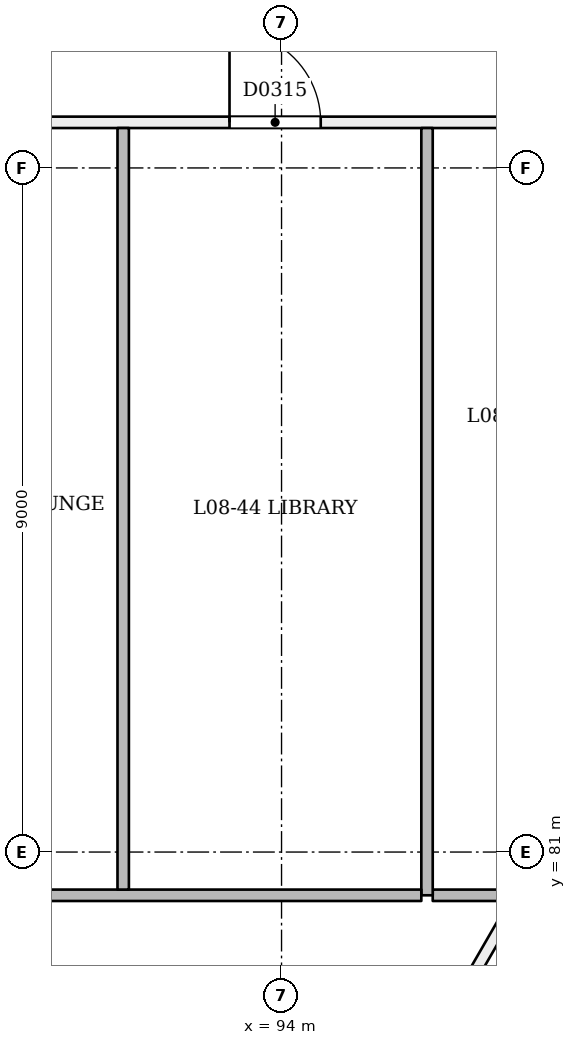
"""IFC4 building model, lengths in metres.
Left out: names, types, materials, properties, quantities, classifications, styles, units other than length and angle.
Written with IfcOpenShell. Run it as: python <this file> out.ifc"""

import sys

from ifc_helpers import new_model, si_unit, direction, frame, frame_2d, origin, place, context, subcontext, project, spatial, rectangle, extrude, element, fill, save


model = new_model("IFC4")
c1 = context("Model", 3, precision=1e-05, world=origin(), true_north=direction((0.0, 1.0)))
c2 = subcontext(c1, "Body", "Model", "MODEL_VIEW")
j1 = project(units=[si_unit("LENGTHUNIT", "METRE"), si_unit("PLANEANGLEUNIT", "RADIAN")], contexts=[c1])
p1 = place(None, origin())
s1 = spatial("IfcSite", under=j1, at=p1, CompositionType="ELEMENT")
p2 = place(p1, origin())
s2 = spatial("IfcBuilding", under=s1, at=p2, CompositionType="ELEMENT")
p3 = place(p2, frame((0.0, 0.0, 37.8)))
s3 = spatial("IfcBuildingStorey", under=s2, at=p3, CompositionType="ELEMENT", Elevation=37.8)
p4 = place(p3, frame((88.317, 61.577, 0.0), z_axis=(0.0, 0.0, 1.0), x_axis=(0.49999894854, 0.866026010844, 0.0)))
e1 = element("IfcWall", 1, at=p4, inside=s3, PredefinedType="PARTITIONING", context=c2, shape_type="SweptSolid", body=[
    extrude(rectangle(XDim=36.0, YDim=0.15, at=frame_2d((18.0, 0.0))), origin(), (0.0, 0.0, 1.0), 2.7),
])
p5 = place(p4, frame((0.72, 0.0, 0.0)))
e2 = element("IfcOpeningElement", 2, at=p5, cuts=e1, PredefinedType="OPENING", context=c2, shape_type="SweptSolid", body=[
    extrude(rectangle(XDim=1.0, YDim=2.1, at=frame_2d((0.5, 1.05))), frame((0.0, 0.085, 0.0), z_axis=(0.0, -1.0, 0.0), x_axis=(1.0, 0.0, 0.0)), (0.0, 0.0, 1.0), 0.171),
])
p6 = place(p4, frame((7.395, 0.0, 0.0)))
e3 = element("IfcOpeningElement", 3, at=p6, cuts=e1, PredefinedType="OPENING", context=c2, shape_type="SweptSolid", body=[
    extrude(rectangle(XDim=1.0, YDim=2.1, at=frame_2d((0.5, 1.05))), frame((0.0, 0.085, 0.0), z_axis=(0.0, -1.0, 0.0), x_axis=(1.0, 0.0, 0.0)), (0.0, 0.0, 1.0), 0.171),
])
p7 = place(p4, frame((9.605, 0.0, 0.0)))
e4 = element("IfcOpeningElement", 4, at=p7, cuts=e1, PredefinedType="OPENING", context=c2, shape_type="SweptSolid", body=[
    extrude(rectangle(XDim=1.0, YDim=2.1, at=frame_2d((0.5, 1.05))), frame((0.0, 0.085, 0.0), z_axis=(0.0, -1.0, 0.0), x_axis=(1.0, 0.0, 0.0)), (0.0, 0.0, 1.0), 0.171),
])
p8 = place(p4, frame((15.25, 0.0, 0.0)))
e5 = element("IfcOpeningElement", 5, at=p8, cuts=e1, PredefinedType="OPENING", context=c2, shape_type="SweptSolid", body=[
    extrude(rectangle(XDim=1.0, YDim=2.1, at=frame_2d((0.5, 1.05))), frame((0.0, 0.085, 0.0), z_axis=(0.0, -1.0, 0.0), x_axis=(1.0, 0.0, 0.0)), (0.0, 0.0, 1.0), 0.171),
])
p9 = place(p4, frame((18.605, 0.0, 0.0)))
e6 = element("IfcOpeningElement", 6, at=p9, cuts=e1, PredefinedType="OPENING", context=c2, shape_type="SweptSolid", body=[
    extrude(rectangle(XDim=1.0, YDim=2.1, at=frame_2d((0.5, 1.05))), frame((0.0, 0.085, 0.0), z_axis=(0.0, -1.0, 0.0), x_axis=(1.0, 0.0, 0.0)), (0.0, 0.0, 1.0), 0.171),
])
p10 = place(p4, frame((25.395, 0.0, 0.0)))
e7 = element("IfcOpeningElement", 7, at=p10, cuts=e1, PredefinedType="OPENING", context=c2, shape_type="SweptSolid", body=[
    extrude(rectangle(XDim=1.0, YDim=2.1, at=frame_2d((0.5, 1.05))), frame((0.0, 0.085, 0.0), z_axis=(0.0, -1.0, 0.0), x_axis=(1.0, 0.0, 0.0)), (0.0, 0.0, 1.0), 0.171),
])
p11 = place(p4, frame((29.8, 0.0, 0.0)))
e8 = element("IfcOpeningElement", 8, at=p11, cuts=e1, PredefinedType="OPENING", context=c2, shape_type="SweptSolid", body=[
    extrude(rectangle(XDim=1.2, YDim=2.1, at=frame_2d((0.6, 1.05))), frame((0.0, 0.085, 0.0), z_axis=(0.0, -1.0, 0.0), x_axis=(1.0, 0.0, 0.0)), (0.0, 0.0, 1.0), 0.171),
])
p12 = place(p3, frame((88.106, 90.6, 0.0), z_axis=(0.0, 0.0, 1.0), x_axis=(1.0, 0.0, 0.0)))
e9 = element("IfcWall", 9, at=p12, inside=s3, PredefinedType="PARTITIONING", context=c2, shape_type="SweptSolid", body=[
    extrude(rectangle(XDim=14.759, YDim=0.15, at=frame_2d((7.379, 0.0))), origin(), (0.0, 0.0, 1.0), 3.1),
])
p13 = place(p12, frame((5.209, 0.0, 0.0)))
e10 = element("IfcOpeningElement", 10, at=p13, cuts=e9, PredefinedType="OPENING", context=c2, shape_type="SweptSolid", body=[
    extrude(rectangle(XDim=1.2, YDim=2.1, at=frame_2d((0.6, 1.05))), frame((0.0, 0.085, 0.0), z_axis=(0.0, -1.0, 0.0), x_axis=(1.0, 0.0, 0.0)), (0.0, 0.0, 1.0), 0.171),
])
p14 = place(p12, frame((1.274, 0.0, 0.0)))
e11 = element("IfcOpeningElement", 11, at=p14, cuts=e9, PredefinedType="OPENING", context=c2, shape_type="SweptSolid", body=[
    extrude(rectangle(XDim=1.2, YDim=2.1, at=frame_2d((0.6, 1.05))), frame((0.0, 0.085, 0.0), z_axis=(0.0, -1.0, 0.0), x_axis=(1.0, 0.0, 0.0)), (0.0, 0.0, 1.0), 0.171),
])
p15 = place(p3, frame((102.995, 90.6, 0.0), z_axis=(0.0, 0.0, 1.0), x_axis=(-0.500002425896, -0.866024003188, 0.0)))
e12 = element("IfcWall", 12, at=p15, inside=s3, PredefinedType="PARTITIONING", context=c2, shape_type="SweptSolid", body=[
    extrude(rectangle(XDim=35.804, YDim=0.15, at=frame_2d((17.902, 0.0))), origin(), (0.0, 0.0, 1.0), 3.1),
])
p16 = place(p15, frame((5.095, 0.0, 0.0)))
e13 = element("IfcOpeningElement", 13, at=p16, cuts=e12, PredefinedType="OPENING", context=c2, shape_type="SweptSolid", body=[
    extrude(rectangle(XDim=1.2, YDim=2.1, at=frame_2d((0.6, 1.05))), frame((0.0, 0.085, 0.0), z_axis=(0.0, -1.0, 0.0), x_axis=(1.0, 0.0, 0.0)), (0.0, 0.0, 1.0), 0.171),
])
p17 = place(p15, frame((15.95, 0.0, 0.0)))
e14 = element("IfcOpeningElement", 14, at=p17, cuts=e12, PredefinedType="OPENING", context=c2, shape_type="SweptSolid", body=[
    extrude(rectangle(XDim=1.2, YDim=2.1, at=frame_2d((0.6, 1.05))), frame((0.0, 0.085, 0.0), z_axis=(0.0, -1.0, 0.0), x_axis=(1.0, 0.0, 0.0)), (0.0, 0.0, 1.0), 0.171),
])
p18 = place(p15, frame((22.564, 0.0, 0.0)))
e15 = element("IfcOpeningElement", 15, at=p18, cuts=e12, PredefinedType="OPENING", context=c2, shape_type="SweptSolid", body=[
    extrude(rectangle(XDim=1.0, YDim=2.1, at=frame_2d((0.5, 1.05))), frame((0.0, 0.085, 0.0), z_axis=(0.0, -1.0, 0.0), x_axis=(1.0, 0.0, 0.0)), (0.0, 0.0, 1.0), 0.171),
])
p19 = place(p3, frame((95.989, 80.431, 0.0), z_axis=(0.0, 0.0, 1.0), x_axis=(1.0, 0.0, 0.0)))
e16 = element("IfcWall", 16, at=p19, inside=s3, PredefinedType="PARTITIONING", context=c2, shape_type="SweptSolid", body=[
    extrude(rectangle(XDim=1.005, YDim=0.15, at=frame_2d((0.503, 0.0))), origin(), (0.0, 0.0, 1.0), 3.1),
])
p20 = place(p3, frame((95.914, 90.525, 0.0), z_axis=(0.0, 0.0, 1.0), x_axis=(0.0, -1.0, 0.0)))
e17 = element("IfcWall", 17, at=p20, inside=s3, PredefinedType="PARTITIONING", context=c2, shape_type="SweptSolid", body=[
    extrude(rectangle(XDim=10.094, YDim=0.15, at=frame_2d((5.047, 0.0))), origin(), (0.0, 0.0, 1.0), 3.1),
])
p21 = place(p3, frame((95.839, 80.431, 0.0), z_axis=(0.0, 0.0, 1.0), x_axis=(-1.0, 0.0, 0.0)))
e18 = element("IfcWall", 18, at=p21, inside=s3, PredefinedType="PARTITIONING", context=c2, shape_type="SweptSolid", body=[
    extrude(rectangle(XDim=7.654, YDim=0.15, at=frame_2d((3.827, 0.0))), origin(), (0.0, 0.0, 1.0), 3.1),
])
p22 = place(p3, frame((91.917, 90.525, 0.0), z_axis=(0.0, 0.0, 1.0), x_axis=(0.0, -1.0, 0.0)))
e19 = element("IfcWall", 19, at=p22, inside=s3, PredefinedType="PARTITIONING", context=c2, shape_type="SweptSolid", body=[
    extrude(rectangle(XDim=10.019, YDim=0.15, at=frame_2d((5.009, 0.0))), origin(), (0.0, 0.0, 1.0), 3.1),
])
p23 = place(p13, origin())
e20 = element("IfcDoor", 20, at=p23, inside=s3, OperationType="SINGLE_SWING_LEFT", PredefinedType="NOTDEFINED", context=c2, shape_type="SweptSolid", body=[
    extrude(rectangle(XDim=1.2, YDim=2.1, at=frame_2d((0.6, 1.05))), frame((0.0, 0.025, 0.0), z_axis=(0.0, -1.0, 0.0), x_axis=(1.0, 0.0, 0.0)), (0.0, 0.0, 1.0), 0.05),
])
fill(e10, e20)
save(model, sys.argv[1])
